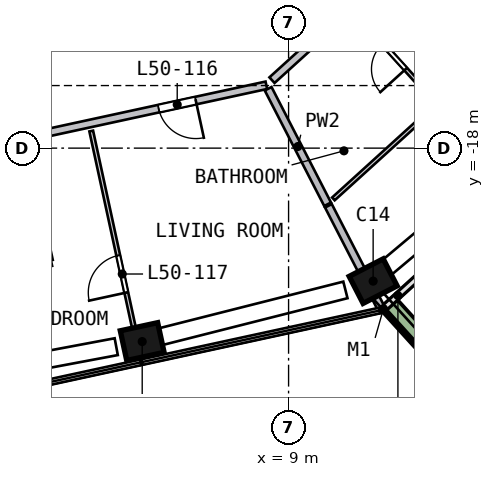
"""IFC4 building model, lengths in metres.
Left out: names, types, materials, properties, quantities, classifications, styles, units other than length and angle.
Written with IfcOpenShell. Run it as: python <this file> out.ifc"""

import sys

from ifc_helpers import new_model, si_unit, direction, frame, frame_2d, origin, origin_2d, place, context, subcontext, project, spatial, rectangle, extrude, element, fill, save


model = new_model("IFC4")
c1 = context("Model", 3, precision=1e-05, world=origin(), true_north=direction((0.0, 1.0)))
c2 = subcontext(c1, "Body", "Model", "MODEL_VIEW")
j1 = project(units=[si_unit("LENGTHUNIT", "METRE"), si_unit("PLANEANGLEUNIT", "RADIAN")], contexts=[c1])
p1 = place(None, origin())
s1 = spatial("IfcSite", under=j1, at=p1, CompositionType="ELEMENT")
p2 = place(p1, origin())
s2 = spatial("IfcBuilding", under=s1, at=p2, CompositionType="ELEMENT")
p3 = place(p2, frame((0.0, 0.0, 205.5)))
s3 = spatial("IfcBuildingStorey", under=s2, at=p3, CompositionType="ELEMENT", Elevation=205.5)
p4 = place(p3, frame((5.016, -23.121, 0.0), z_axis=(0.109813294, 0.024791644, 0.993643002), x_axis=(0.971071774, 0.210587098, -0.112573017)))
e1 = element("IfcColumn", 1, at=p4, inside=s3, PredefinedType="COLUMN", context=c2, shape_type="SweptSolid", body=[
    extrude(rectangle(XDim=1.0, YDim=0.8, at=origin_2d()), origin(), (0.0, 0.0, 1.0), 3.21),
])
p5 = place(p3, frame((11.102, -21.565, 0.0), z_axis=(0.102099777, 0.053672705, 0.993325161), x_axis=(-0.883131513, -0.4547247, 0.115343736)))
e2 = element("IfcColumn", 2, at=p5, inside=s3, PredefinedType="COLUMN", context=c2, shape_type="SweptSolid", body=[
    extrude(rectangle(XDim=1.0, YDim=0.8, at=origin_2d()), origin(), (0.0, 0.0, 1.0), 3.211),
])
p6 = place(p3, frame((11.519, -22.206, 0.0), z_axis=(0.0, 0.0, 1.0), x_axis=(0.74031866, 0.672256113, 0.0)))
e3 = element("IfcWall", 3, at=p6, inside=s3, PredefinedType="SOLIDWALL", context=c2, shape_type="SweptSolid", body=[
    extrude(rectangle(XDim=3.967, YDim=0.15, at=frame_2d((1.984, 0.0))), origin(), (0.0, 0.0, 1.0), 2.475),
])
p7 = place(p6, frame((1.167, 0.0, 0.0)))
e4 = element("IfcOpeningElement", 4, at=p7, cuts=e3, PredefinedType="OPENING", context=c2, shape_type="SweptSolid", body=[
    extrude(rectangle(XDim=2.4, YDim=2.4, at=frame_2d((1.2, 1.2))), frame((0.0, 0.085, 0.0), z_axis=(0.0, -1.0, 0.0), x_axis=(1.0, 0.0, 0.0)), (0.0, 0.0, 1.0), 0.17),
])
p8 = place(p3, frame((11.681, -22.162, 0.0), z_axis=(0.0, 0.0, 1.0), x_axis=(0.672289039, -0.74028876, 0.0)))
e5 = element("IfcWall", 5, at=p8, inside=s3, PredefinedType="SOLIDWALL", context=c2, shape_type="SweptSolid", body=[
    extrude(rectangle(XDim=3.199, YDim=0.5, at=frame_2d((1.6, 0.0))), origin(), (0.0, 0.0, 1.0), 0.7),
])
p9 = place(p3, frame((8.415, -16.346, 0.0), z_axis=(0.0, 0.0, 1.0), x_axis=(-0.97726969, -0.211999887, 0.0)))
e6 = element("IfcWall", 6, at=p9, inside=s3, PredefinedType="SOLIDWALL", context=c2, shape_type="SweptSolid", body=[
    extrude(rectangle(XDim=9.316, YDim=0.2, at=frame_2d((4.658, 0.0))), origin(), (0.0, 0.0, 1.0), 3.19),
])
p10 = place(p9, frame((1.9, 0.0, 0.0)))
e7 = element("IfcOpeningElement", 7, at=p10, cuts=e6, PredefinedType="OPENING", context=c2, shape_type="SweptSolid", body=[
    extrude(rectangle(XDim=1.0, YDim=2.1, at=frame_2d((0.5, 1.05))), frame((0.0, 0.11, 0.0), z_axis=(0.0, -1.0, 0.0), x_axis=(1.0, 0.0, 0.0)), (0.0, 0.0, 1.0), 0.22),
])
p11 = place(p3, frame((15.46, -9.948, 0.0), z_axis=(0.0, 0.0, 1.0), x_axis=(-0.740327695, -0.672246163, 0.0)))
e8 = element("IfcWall", 8, at=p11, inside=s3, PredefinedType="SOLIDWALL", context=c2, shape_type="SweptSolid", body=[
    extrude(rectangle(XDim=9.316, YDim=0.2, at=frame_2d((4.658, 0.0))), origin(), (0.0, 0.0, 1.0), 3.19),
])
p12 = place(p11, frame((5.15, 0.0, 0.0)))
e9 = element("IfcOpeningElement", 9, at=p12, cuts=e8, PredefinedType="OPENING", context=c2, shape_type="SweptSolid", body=[
    extrude(rectangle(XDim=1.0, YDim=2.1, at=frame_2d((0.5, 1.05))), frame((0.0, 0.11, 0.0), z_axis=(0.0, -1.0, 0.0), x_axis=(1.0, 0.0, 0.0)), (0.0, 0.0, 1.0), 0.22),
])
p13 = place(p3, frame((8.462, -16.438, 0.0), z_axis=(0.0, 0.0, 1.0), x_axis=(0.45772397, -0.889094352, 0.0)))
e10 = element("IfcWall", 10, at=p13, inside=s3, PredefinedType="SOLIDWALL", context=c2, shape_type="SweptSolid", body=[
    extrude(rectangle(XDim=3.418, YDim=0.2, at=frame_2d((1.709, 0.0))), origin(), (0.0, 0.0, 1.0), 3.19),
])
p14 = place(p3, frame((10.048, -19.518, 0.0), z_axis=(0.0, 0.0, 1.0), x_axis=(0.457721659, -0.889095542, 0.0)))
e11 = element("IfcWall", 11, at=p14, inside=s3, PredefinedType="SOLIDWALL", context=c2, shape_type="SweptSolid", body=[
    extrude(rectangle(XDim=3.011, YDim=0.2, at=frame_2d((1.506, 0.0))), origin(), (0.0, 0.0, 1.0), 3.19),
])
p15 = place(p3, frame((2.746, -20.952, 0.0), z_axis=(0.0, 0.0, 1.0), x_axis=(-0.212007846, 0.977267964, 0.0)))
e12 = element("IfcWall", 12, at=p15, inside=s3, PredefinedType="PARTITIONING", context=c2, shape_type="SweptSolid", body=[
    extrude(rectangle(XDim=3.1, YDim=0.1, at=frame_2d((1.55, 0.0))), origin(), (0.0, 0.0, 1.0), 3.19),
])
p16 = place(p15, frame((1.15, 0.0, 0.0)))
e13 = element("IfcOpeningElement", 13, at=p16, cuts=e12, PredefinedType="OPENING", context=c2, shape_type="SweptSolid", body=[
    extrude(rectangle(XDim=0.9, YDim=2.1, at=frame_2d((0.45, 1.05))), frame((0.0, 0.06, 0.0), z_axis=(0.0, -1.0, 0.0), x_axis=(1.0, 0.0, 0.0)), (0.0, 0.0, 1.0), 0.12),
])
p17 = place(p3, frame((5.111, -23.56, 0.0), z_axis=(0.0, 0.0, 1.0), x_axis=(-0.211984638, 0.977272998, 0.0)))
e14 = element("IfcWall", 14, at=p17, inside=s3, PredefinedType="PARTITIONING", context=c2, shape_type="SweptSolid", body=[
    extrude(rectangle(XDim=6.15, YDim=0.1, at=frame_2d((3.075, 0.0))), origin(), (0.0, 0.0, 1.0), 3.19),
])
p18 = place(p17, frame((1.8, 0.0, 0.0)))
e15 = element("IfcOpeningElement", 15, at=p18, cuts=e14, PredefinedType="OPENING", context=c2, shape_type="SweptSolid", body=[
    extrude(rectangle(XDim=1.0, YDim=2.1, at=frame_2d((0.5, 1.05))), frame((0.0, 0.06, 0.0), z_axis=(0.0, -1.0, 0.0), x_axis=(1.0, 0.0, 0.0)), (0.0, 0.0, 1.0), 0.12),
])
p19 = place(p3, frame((12.922, -16.846, 0.0), z_axis=(0.0, 0.0, 1.0), x_axis=(-0.740330652, -0.672242906, 0.0)))
e16 = element("IfcWall", 16, at=p19, inside=s3, PredefinedType="PARTITIONING", context=c2, shape_type="SweptSolid", body=[
    extrude(rectangle(XDim=3.704, YDim=0.1, at=frame_2d((1.852, 0.0))), origin(), (0.0, 0.0, 1.0), 3.19),
])
p20 = place(p3, frame((12.854, -16.772, 0.0), z_axis=(0.0, 0.0, 1.0), x_axis=(-0.672265011, 0.74031058, 0.0)))
e17 = element("IfcWall", 17, at=p20, inside=s3, PredefinedType="PARTITIONING", context=c2, shape_type="SweptSolid", body=[
    extrude(rectangle(XDim=3.1, YDim=0.1, at=frame_2d((1.55, 0.0))), origin(), (0.0, 0.0, 1.0), 3.19),
])
p21 = place(p20, frame((1.15, 0.0, 0.0)))
e18 = element("IfcOpeningElement", 18, at=p21, cuts=e17, PredefinedType="OPENING", context=c2, shape_type="SweptSolid", body=[
    extrude(rectangle(XDim=0.9, YDim=2.1, at=frame_2d((0.45, 1.05))), frame((0.0, 0.06, 0.0), z_axis=(0.0, -1.0, 0.0), x_axis=(1.0, 0.0, 0.0)), (0.0, 0.0, 1.0), 0.12),
])
p22 = place(p10, origin())
e19 = element("IfcDoor", 19, at=p22, inside=s3, OperationType="SINGLE_SWING_LEFT", PredefinedType="DOOR", context=c2, shape_type="SweptSolid", body=[
    extrude(rectangle(XDim=1.0, YDim=2.1, at=frame_2d((0.5, 1.05))), frame((0.0, 0.025, 0.0), z_axis=(0.0, -1.0, 0.0), x_axis=(1.0, 0.0, 0.0)), (0.0, 0.0, 1.0), 0.05),
])
fill(e7, e19)
p23 = place(p18, origin())
e20 = element("IfcDoor", 20, at=p23, inside=s3, OperationType="SINGLE_SWING_LEFT", PredefinedType="DOOR", context=c2, shape_type="SweptSolid", body=[
    extrude(rectangle(XDim=1.0, YDim=2.1, at=frame_2d((0.5, 1.05))), frame((0.0, 0.025, 0.0), z_axis=(0.0, -1.0, 0.0), x_axis=(1.0, 0.0, 0.0)), (0.0, 0.0, 1.0), 0.05),
])
fill(e15, e20)
p24 = place(p21, origin())
e21 = element("IfcDoor", 21, at=p24, inside=s3, OperationType="SINGLE_SWING_LEFT", PredefinedType="DOOR", context=c2, shape_type="SweptSolid", body=[
    extrude(rectangle(XDim=0.9, YDim=2.1, at=frame_2d((0.45, 1.05))), frame((0.0, 0.025, 0.0), z_axis=(0.0, -1.0, 0.0), x_axis=(1.0, 0.0, 0.0)), (0.0, 0.0, 1.0), 0.05),
])
fill(e18, e21)
save(model, sys.argv[1])
